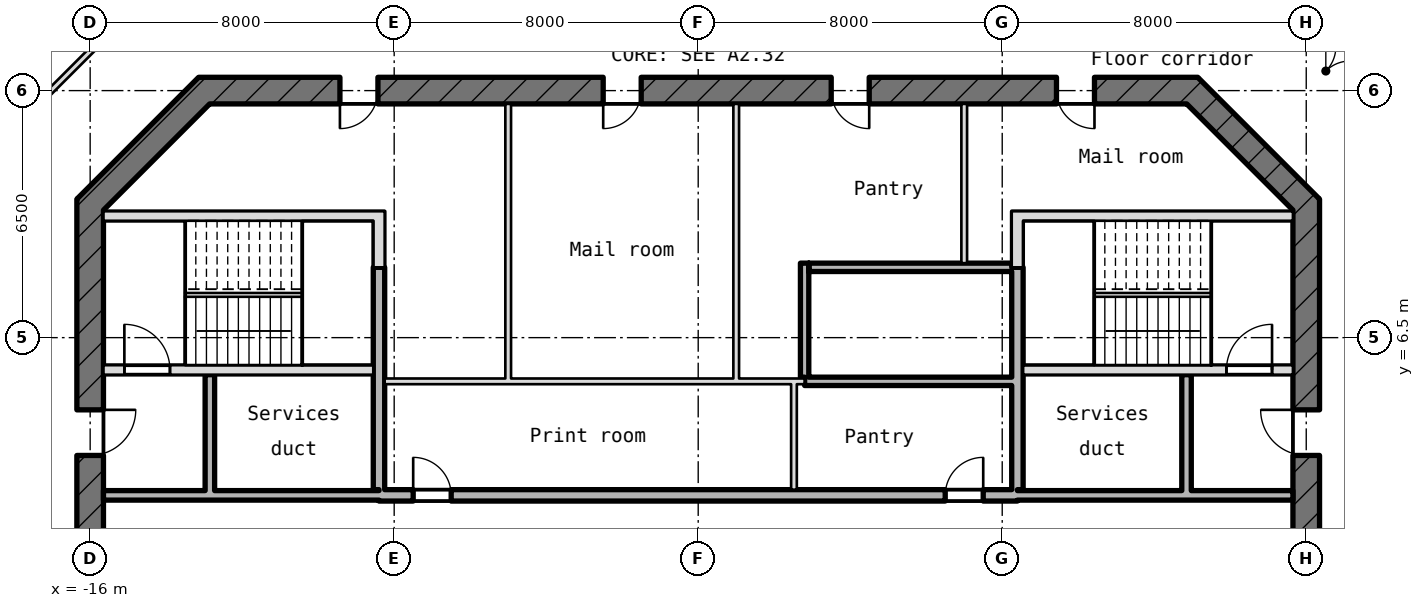
"""IFC4 building model, lengths in metres.
Left out: names, types, materials, properties, quantities, classifications, styles, units other than length and angle.
Written with IfcOpenShell. Run it as: python <this file> out.ifc"""

import sys

from ifc_helpers import new_model, si_unit, direction, frame, frame_2d, origin, place, context, subcontext, project, spatial, rectangle, extrude, element, fill, save


model = new_model("IFC4")
c1 = context("Model", 3, precision=1e-05, world=origin(), true_north=direction((0.0, 1.0)))
c2 = subcontext(c1, "Body", "Model", "MODEL_VIEW")
j1 = project(units=[si_unit("LENGTHUNIT", "METRE"), si_unit("PLANEANGLEUNIT", "RADIAN")], contexts=[c1])
p1 = place(None, origin())
s1 = spatial("IfcSite", under=j1, at=p1, CompositionType="ELEMENT")
p2 = place(p1, origin())
s2 = spatial("IfcBuilding", under=s1, at=p2, CompositionType="ELEMENT")
p3 = place(p2, frame((0.0, 0.0, 346.75)))
s3 = spatial("IfcBuildingStorey", under=s2, at=p3, CompositionType="ELEMENT", Elevation=346.75)
p4 = place(p3, frame((16.0, -10.145, -0.18), z_axis=(0.0, 0.0, 1.0), x_axis=(0.0, 1.0, 0.0)))
e1 = element("IfcWall", 1, at=p4, inside=s3, PredefinedType="SHEAR", context=c2, shape_type="SweptSolid", body=[
    extrude(rectangle(XDim=20.29, YDim=0.7, at=frame_2d((10.145, 0.0))), origin(), (0.0, 0.0, 1.0), 4.15),
])
p5 = place(p4, frame((8.945, 0.0, 0.18)))
e2 = element("IfcOpeningElement", 2, at=p5, cuts=e1, PredefinedType="OPENING", context=c2, shape_type="SweptSolid", body=[
    extrude(rectangle(XDim=2.4, YDim=2.1, at=frame_2d((1.2, 1.05))), frame((0.0, 0.36, 0.0), z_axis=(0.0, -1.0, 0.0), x_axis=(1.0, 0.0, 0.0)), (0.0, 0.0, 1.0), 0.72),
])
p6 = place(p4, frame((13.545, 0.0, 0.18)))
e3 = element("IfcOpeningElement", 3, at=p6, cuts=e1, PredefinedType="OPENING", context=c2, shape_type="SweptSolid", body=[
    extrude(rectangle(XDim=1.2, YDim=2.1, at=frame_2d((0.6, 1.05))), frame((0.0, 0.36, 0.0), z_axis=(0.0, -1.0, 0.0), x_axis=(1.0, 0.0, 0.0)), (0.0, 0.0, 1.0), 0.72),
])
p7 = place(p3, frame((16.103, 9.897, -0.18), z_axis=(0.0, 0.0, 1.0), x_axis=(-0.707106781187, 0.707106781187, 0.0)))
e4 = element("IfcWall", 4, at=p7, inside=s3, PredefinedType="SHEAR", context=c2, shape_type="SweptSolid", body=[
    extrude(rectangle(XDim=4.533, YDim=0.7, at=frame_2d((2.266, 0.0))), origin(), (0.0, 0.0, 1.0), 4.15),
])
p8 = place(p3, frame((13.145, 13.0, -0.18), z_axis=(0.0, 0.0, 1.0), x_axis=(-1.0, 0.0, 0.0)))
e5 = element("IfcWall", 5, at=p8, inside=s3, PredefinedType="SHEAR", context=c2, shape_type="SweptSolid", body=[
    extrude(rectangle(XDim=26.29, YDim=0.7, at=frame_2d((13.145, 0.0))), origin(), (0.0, 0.0, 1.0), 4.15),
])
p9 = place(p8, frame((21.573, 0.0, 0.18)))
e6 = element("IfcOpeningElement", 6, at=p9, cuts=e5, PredefinedType="OPENING", context=c2, shape_type="SweptSolid", body=[
    extrude(rectangle(XDim=1.0, YDim=2.1, at=frame_2d((0.5, 1.05))), frame((0.0, 0.36, 0.0), z_axis=(0.0, -1.0, 0.0), x_axis=(1.0, 0.0, 0.0)), (0.0, 0.0, 1.0), 0.72),
])
p10 = place(p8, frame((14.645, 0.0, 0.18)))
e7 = element("IfcOpeningElement", 7, at=p10, cuts=e5, PredefinedType="OPENING", context=c2, shape_type="SweptSolid", body=[
    extrude(rectangle(XDim=1.0, YDim=2.1, at=frame_2d((0.5, 1.05))), frame((0.0, 0.36, 0.0), z_axis=(0.0, -1.0, 0.0), x_axis=(1.0, 0.0, 0.0)), (0.0, 0.0, 1.0), 0.72),
])
p11 = place(p8, frame((8.645, 0.0, 0.18)))
e8 = element("IfcOpeningElement", 8, at=p11, cuts=e5, PredefinedType="OPENING", context=c2, shape_type="SweptSolid", body=[
    extrude(rectangle(XDim=1.0, YDim=2.1, at=frame_2d((0.5, 1.05))), frame((0.0, 0.36, 0.0), z_axis=(0.0, -1.0, 0.0), x_axis=(1.0, 0.0, 0.0)), (0.0, 0.0, 1.0), 0.72),
])
p12 = place(p8, frame((2.717, 0.0, 0.18)))
e9 = element("IfcOpeningElement", 9, at=p12, cuts=e5, PredefinedType="OPENING", context=c2, shape_type="SweptSolid", body=[
    extrude(rectangle(XDim=1.0, YDim=2.1, at=frame_2d((0.5, 1.05))), frame((0.0, 0.36, 0.0), z_axis=(0.0, -1.0, 0.0), x_axis=(1.0, 0.0, 0.0)), (0.0, 0.0, 1.0), 0.72),
])
p13 = place(p3, frame((-12.897, 13.103, -0.18), z_axis=(0.0, 0.0, 1.0), x_axis=(-0.707106781187, -0.707106781187, 0.0)))
e10 = element("IfcWall", 10, at=p13, inside=s3, PredefinedType="SHEAR", context=c2, shape_type="SweptSolid", body=[
    extrude(rectangle(XDim=4.533, YDim=0.7, at=frame_2d((2.266, 0.0))), origin(), (0.0, 0.0, 1.0), 4.15),
])
p14 = place(p3, frame((-16.0, 10.145, -0.18), z_axis=(0.0, 0.0, 1.0), x_axis=(0.0, -1.0, 0.0)))
e11 = element("IfcWall", 11, at=p14, inside=s3, PredefinedType="SHEAR", context=c2, shape_type="SweptSolid", body=[
    extrude(rectangle(XDim=20.29, YDim=0.7, at=frame_2d((10.145, 0.0))), origin(), (0.0, 0.0, 1.0), 4.15),
])
p15 = place(p14, frame((8.945, 0.0, 0.18)))
e12 = element("IfcOpeningElement", 12, at=p15, cuts=e11, PredefinedType="OPENING", context=c2, shape_type="SweptSolid", body=[
    extrude(rectangle(XDim=2.4, YDim=2.1, at=frame_2d((1.2, 1.05))), frame((0.0, 0.36, 0.0), z_axis=(0.0, -1.0, 0.0), x_axis=(1.0, 0.0, 0.0)), (0.0, 0.0, 1.0), 0.72),
])
p16 = place(p14, frame((5.545, 0.0, 0.18)))
e13 = element("IfcOpeningElement", 13, at=p16, cuts=e11, PredefinedType="OPENING", context=c2, shape_type="SweptSolid", body=[
    extrude(rectangle(XDim=1.2, YDim=2.1, at=frame_2d((0.6, 1.05))), frame((0.0, 0.36, 0.0), z_axis=(0.0, -1.0, 0.0), x_axis=(1.0, 0.0, 0.0)), (0.0, 0.0, 1.0), 0.72),
])
p17 = place(p3, frame((-15.65, 2.35, 0.0), z_axis=(0.0, 0.0, 1.0), x_axis=(1.0, 0.0, 0.0)))
e14 = element("IfcWall", 14, at=p17, inside=s3, PredefinedType="STANDARD", context=c2, shape_type="SweptSolid", body=[
    extrude(rectangle(XDim=7.25, YDim=0.25, at=frame_2d((3.625, 0.0))), origin(), (0.0, 0.0, 1.0), 3.97),
])
p18 = place(p3, frame((-8.4, 2.35, -0.18), z_axis=(0.0, 0.0, 1.0), x_axis=(1.0, 0.0, 0.0)))
e15 = element("IfcWall", 15, at=p18, inside=s3, PredefinedType="SHEAR", context=c2, shape_type="SweptSolid", body=[
    extrude(rectangle(XDim=16.8, YDim=0.3, at=frame_2d((8.4, 0.0))), origin(), (0.0, 0.0, 1.0), 4.15),
])
p19 = place(p18, frame((0.9, 0.0, 0.18)))
e16 = element("IfcOpeningElement", 16, at=p19, cuts=e15, PredefinedType="OPENING", context=c2, shape_type="SweptSolid", body=[
    extrude(rectangle(XDim=1.0, YDim=2.1, at=frame_2d((0.5, 1.05))), frame((0.0, 0.16, 0.0), z_axis=(0.0, -1.0, 0.0), x_axis=(1.0, 0.0, 0.0)), (0.0, 0.0, 1.0), 0.32),
])
p20 = place(p18, frame((14.9, 0.0, 0.18)))
e17 = element("IfcOpeningElement", 17, at=p20, cuts=e15, PredefinedType="OPENING", context=c2, shape_type="SweptSolid", body=[
    extrude(rectangle(XDim=1.0, YDim=2.1, at=frame_2d((0.5, 1.05))), frame((0.0, 0.16, 0.0), z_axis=(0.0, -1.0, 0.0), x_axis=(1.0, 0.0, 0.0)), (0.0, 0.0, 1.0), 0.32),
])
p21 = place(p3, frame((8.4, 2.35, 0.0), z_axis=(0.0, 0.0, 1.0), x_axis=(1.0, 0.0, 0.0)))
e18 = element("IfcWall", 18, at=p21, inside=s3, PredefinedType="STANDARD", context=c2, shape_type="SweptSolid", body=[
    extrude(rectangle(XDim=7.25, YDim=0.25, at=frame_2d((3.625, 0.0))), origin(), (0.0, 0.0, 1.0), 3.97),
])
p22 = place(p3, frame((-8.25, 5.35, 0.0), z_axis=(0.0, 0.0, 1.0), x_axis=(1.0, 0.0, 0.0)))
e19 = element("IfcWall", 19, at=p22, inside=s3, PredefinedType="PARTITIONING", context=c2, shape_type="SweptSolid", body=[
    extrude(rectangle(XDim=11.05, YDim=0.15, at=frame_2d((5.525, 0.0))), origin(), (0.0, 0.0, 1.0), 3.97),
])
p23 = place(p3, frame((2.8, 5.35, 0.0), z_axis=(0.0, 0.0, 1.0), x_axis=(1.0, 0.0, 0.0)))
e20 = element("IfcWall", 20, at=p23, inside=s3, PredefinedType="STANDARD", context=c2, shape_type="SweptSolid", body=[
    extrude(rectangle(XDim=5.45, YDim=0.22, at=frame_2d((2.725, 0.0))), origin(), (0.0, 0.0, 1.0), 3.97),
])
p24 = place(p3, frame((-15.65, 5.65, -0.18), z_axis=(0.0, 0.0, 1.0), x_axis=(1.0, 0.0, 0.0)))
e21 = element("IfcWall", 21, at=p24, inside=s3, PredefinedType="SHEAR", context=c2, shape_type="SweptSolid", body=[
    extrude(rectangle(XDim=7.1, YDim=0.25, at=frame_2d((3.55, 0.0))), origin(), (0.0, 0.0, 1.0), 4.15),
])
p25 = place(p24, frame((0.55, 0.0, 0.18)))
e22 = element("IfcOpeningElement", 22, at=p25, cuts=e21, PredefinedType="OPENING", context=c2, shape_type="SweptSolid", body=[
    extrude(rectangle(XDim=1.2, YDim=2.1, at=frame_2d((0.6, 1.05))), frame((0.0, 0.135, 0.0), z_axis=(0.0, -1.0, 0.0), x_axis=(1.0, 0.0, 0.0)), (0.0, 0.0, 1.0), 0.27),
])
p26 = place(p3, frame((8.55, 5.65, -0.18), z_axis=(0.0, 0.0, 1.0), x_axis=(1.0, 0.0, 0.0)))
e23 = element("IfcWall", 23, at=p26, inside=s3, PredefinedType="SHEAR", context=c2, shape_type="SweptSolid", body=[
    extrude(rectangle(XDim=7.1, YDim=0.25, at=frame_2d((3.55, 0.0))), origin(), (0.0, 0.0, 1.0), 4.15),
])
p27 = place(p26, frame((5.35, 0.0, 0.18)))
e24 = element("IfcOpeningElement", 24, at=p27, cuts=e23, PredefinedType="OPENING", context=c2, shape_type="SweptSolid", body=[
    extrude(rectangle(XDim=1.2, YDim=2.1, at=frame_2d((0.6, 1.05))), frame((0.0, 0.135, 0.0), z_axis=(0.0, -1.0, 0.0), x_axis=(1.0, 0.0, 0.0)), (0.0, 0.0, 1.0), 0.27),
])
p28 = place(p3, frame((2.91, 8.35, 0.0), z_axis=(0.0, 0.0, 1.0), x_axis=(1.0, 0.0, 0.0)))
e25 = element("IfcWall", 25, at=p28, inside=s3, PredefinedType="STANDARD", context=c2, shape_type="SweptSolid", body=[
    extrude(rectangle(XDim=5.34, YDim=0.22, at=frame_2d((2.67, 0.0))), origin(), (0.0, 0.0, 1.0), 3.97),
])
for number, where, z_axis, x_axis in (
    (26, (-15.65, 9.7, -0.18), (0.0, 0.0, 1.0), (1.0, 0.0, 0.0)),
    (27, (8.55, 9.7, -0.18), (0.0, 0.0, 1.0), (1.0, 0.0, 0.0)),
):
    element("IfcWall", number, at=place(p3, frame(where, z_axis=z_axis, x_axis=x_axis)), inside=s3, PredefinedType="SHEAR", context=c2, shape_type="SweptSolid", body=[
        extrude(rectangle(XDim=7.1, YDim=0.25, at=frame_2d((3.55, 0.0))), origin(), (0.0, 0.0, 1.0), 4.15),
    ])
p29 = place(p3, frame((-12.85, 2.475, 0.0), z_axis=(0.0, 0.0, 1.0), x_axis=(0.0, 1.0, 0.0)))
e28 = element("IfcWall", 28, at=p29, inside=s3, PredefinedType="STANDARD", context=c2, shape_type="SweptSolid", body=[
    extrude(rectangle(XDim=3.05, YDim=0.25, at=frame_2d((1.525, 0.0))), origin(), (0.0, 0.0, 1.0), 3.97),
])
p30 = place(p3, frame((-8.4, 2.5, -0.18), z_axis=(0.0, 0.0, 1.0), x_axis=(0.0, 1.0, 0.0)))
e29 = element("IfcWall", 29, at=p30, inside=s3, PredefinedType="SHEAR", context=c2, shape_type="SweptSolid", body=[
    extrude(rectangle(XDim=5.85, YDim=0.3, at=frame_2d((2.925, 0.0))), origin(), (0.0, 0.0, 1.0), 4.15),
])
p31 = place(p3, frame((-8.4, 8.35, -0.18), z_axis=(0.0, 0.0, 1.0), x_axis=(0.0, 1.0, 0.0)))
e30 = element("IfcWall", 30, at=p31, inside=s3, PredefinedType="SHEAR", context=c2, shape_type="SweptSolid", body=[
    extrude(rectangle(XDim=1.475, YDim=0.3, at=frame_2d((0.737, 0.0))), origin(), (0.0, 0.0, 1.0), 4.15),
])
for number, where, z_axis, x_axis in (
    (31, (-5.0, 5.425, 0.0), (0.0, 0.0, 1.0), (0.0, 1.0, 0.0)),
    (32, (1.0, 5.425, 0.0), (0.0, 0.0, 1.0), (0.0, 1.0, 0.0)),
):
    element("IfcWall", number, at=place(p3, frame(where, z_axis=z_axis, x_axis=x_axis)), inside=s3, PredefinedType="PARTITIONING", context=c2, shape_type="SweptSolid", body=[
        extrude(rectangle(XDim=7.225, YDim=0.15, at=frame_2d((3.612, 0.0))), origin(), (0.0, 0.0, 1.0), 3.97),
    ])
p32 = place(p3, frame((2.52, 2.5, 0.0), z_axis=(0.0, 0.0, 1.0), x_axis=(0.0, 1.0, 0.0)))
e33 = element("IfcWall", 33, at=p32, inside=s3, PredefinedType="PARTITIONING", context=c2, shape_type="SweptSolid", body=[
    extrude(rectangle(XDim=2.775, YDim=0.15, at=frame_2d((1.387, 0.0))), origin(), (0.0, 0.0, 1.0), 3.97),
])
p33 = place(p3, frame((2.8, 5.46, 0.0), z_axis=(0.0, 0.0, 1.0), x_axis=(0.0, 1.0, 0.0)))
e34 = element("IfcWall", 34, at=p33, inside=s3, PredefinedType="STANDARD", context=c2, shape_type="SweptSolid", body=[
    extrude(rectangle(XDim=3.0, YDim=0.22, at=frame_2d((1.5, 0.0))), origin(), (0.0, 0.0, 1.0), 3.97),
])
p34 = place(p3, frame((7.0, 8.46, 0.0), z_axis=(0.0, 0.0, 1.0), x_axis=(0.0, 1.0, 0.0)))
e35 = element("IfcWall", 35, at=p34, inside=s3, PredefinedType="PARTITIONING", context=c2, shape_type="SweptSolid", body=[
    extrude(rectangle(XDim=4.19, YDim=0.15, at=frame_2d((2.095, 0.0))), origin(), (0.0, 0.0, 1.0), 3.97),
])
p35 = place(p3, frame((8.4, 2.5, -0.18), z_axis=(0.0, 0.0, 1.0), x_axis=(0.0, 1.0, 0.0)))
e36 = element("IfcWall", 36, at=p35, inside=s3, PredefinedType="SHEAR", context=c2, shape_type="SweptSolid", body=[
    extrude(rectangle(XDim=5.85, YDim=0.3, at=frame_2d((2.925, 0.0))), origin(), (0.0, 0.0, 1.0), 4.15),
])
p36 = place(p3, frame((8.4, 8.35, -0.18), z_axis=(0.0, 0.0, 1.0), x_axis=(0.0, 1.0, 0.0)))
e37 = element("IfcWall", 37, at=p36, inside=s3, PredefinedType="SHEAR", context=c2, shape_type="SweptSolid", body=[
    extrude(rectangle(XDim=1.475, YDim=0.3, at=frame_2d((0.737, 0.0))), origin(), (0.0, 0.0, 1.0), 4.15),
])
p37 = place(p3, frame((12.85, 2.475, 0.0), z_axis=(0.0, 0.0, 1.0), x_axis=(0.0, 1.0, 0.0)))
e38 = element("IfcWall", 38, at=p37, inside=s3, PredefinedType="STANDARD", context=c2, shape_type="SweptSolid", body=[
    extrude(rectangle(XDim=3.05, YDim=0.25, at=frame_2d((1.525, 0.0))), origin(), (0.0, 0.0, 1.0), 3.97),
])
p38 = place(p3, frame((-18.85, 11.18, 0.0), z_axis=(0.0, 0.0, 1.0), x_axis=(0.707106781187, 0.707106781187, 0.0)))
e39 = element("IfcWall", 39, at=p38, inside=s3, PredefinedType="PARTITIONING", context=c2, shape_type="SweptSolid", body=[
    extrude(rectangle(XDim=6.604, YDim=0.15, at=frame_2d((3.302, 0.0))), origin(), (0.0, 0.0, 1.0), 3.97),
])
p39 = place(p3, frame((14.18, 15.85, 0.0), z_axis=(0.0, 0.0, 1.0), x_axis=(0.707106781187, -0.707106781187, 0.0)))
e40 = element("IfcWall", 40, at=p39, inside=s3, PredefinedType="PARTITIONING", context=c2, shape_type="SweptSolid", body=[
    extrude(rectangle(XDim=6.604, YDim=0.15, at=frame_2d((3.302, 0.0))), origin(), (0.0, 0.0, 1.0), 3.97),
])
p40 = place(p39, frame((2.402, 0.0, 0.0)))
e41 = element("IfcOpeningElement", 41, at=p40, cuts=e40, PredefinedType="OPENING", context=c2, shape_type="SweptSolid", body=[
    extrude(rectangle(XDim=1.8, YDim=2.1, at=frame_2d((0.9, 1.05))), frame((0.0, 0.085, 0.0), z_axis=(0.0, -1.0, 0.0), x_axis=(1.0, 0.0, 0.0)), (0.0, 0.0, 1.0), 0.17),
])
p41 = place(p25, origin())
e42 = element("IfcDoor", 42, at=p41, inside=s3, OperationType="SINGLE_SWING_RIGHT", PredefinedType="DOOR", context=c2, shape_type="SweptSolid", body=[
    extrude(rectangle(XDim=1.2, YDim=2.1, at=frame_2d((0.6, 1.05))), frame((0.0, 0.025, 0.0), z_axis=(0.0, -1.0, 0.0), x_axis=(1.0, 0.0, 0.0)), (0.0, 0.0, 1.0), 0.05),
])
fill(e22, e42)
p42 = place(p27, origin())
e43 = element("IfcDoor", 43, at=p42, inside=s3, OperationType="SINGLE_SWING_RIGHT", PredefinedType="DOOR", context=c2, shape_type="SweptSolid", body=[
    extrude(rectangle(XDim=1.2, YDim=2.1, at=frame_2d((0.6, 1.05))), frame((0.0, 0.025, 0.0), z_axis=(0.0, -1.0, 0.0), x_axis=(1.0, 0.0, 0.0)), (0.0, 0.0, 1.0), 0.05),
])
fill(e24, e43)
p43 = place(p16, origin())
e44 = element("IfcDoor", 44, at=p43, inside=s3, OperationType="SINGLE_SWING_RIGHT", PredefinedType="DOOR", context=c2, shape_type="SweptSolid", body=[
    extrude(rectangle(XDim=1.2, YDim=2.1, at=frame_2d((0.6, 1.05))), frame((0.0, 0.025, 0.0), z_axis=(0.0, -1.0, 0.0), x_axis=(1.0, 0.0, 0.0)), (0.0, 0.0, 1.0), 0.05),
])
fill(e13, e44)
p44 = place(p6, origin())
e45 = element("IfcDoor", 45, at=p44, inside=s3, OperationType="SINGLE_SWING_RIGHT", PredefinedType="DOOR", context=c2, shape_type="SweptSolid", body=[
    extrude(rectangle(XDim=1.2, YDim=2.1, at=frame_2d((0.6, 1.05))), frame((0.0, 0.025, 0.0), z_axis=(0.0, -1.0, 0.0), x_axis=(1.0, 0.0, 0.0)), (0.0, 0.0, 1.0), 0.05),
])
fill(e3, e45)
p45 = place(p19, origin())
e46 = element("IfcDoor", 46, at=p45, inside=s3, OperationType="SINGLE_SWING_RIGHT", PredefinedType="DOOR", context=c2, shape_type="SweptSolid", body=[
    extrude(rectangle(XDim=1.0, YDim=2.1, at=frame_2d((0.5, 1.05))), frame((0.0, 0.025, 0.0), z_axis=(0.0, -1.0, 0.0), x_axis=(1.0, 0.0, 0.0)), (0.0, 0.0, 1.0), 0.05),
])
fill(e16, e46)
p46 = place(p20, origin())
e47 = element("IfcDoor", 47, at=p46, inside=s3, OperationType="SINGLE_SWING_RIGHT", PredefinedType="DOOR", context=c2, shape_type="SweptSolid", body=[
    extrude(rectangle(XDim=1.0, YDim=2.1, at=frame_2d((0.5, 1.05))), frame((0.0, 0.025, 0.0), z_axis=(0.0, -1.0, 0.0), x_axis=(1.0, 0.0, 0.0)), (0.0, 0.0, 1.0), 0.05),
])
fill(e17, e47)
p47 = place(p9, origin())
e48 = element("IfcDoor", 48, at=p47, inside=s3, OperationType="SINGLE_SWING_RIGHT", PredefinedType="DOOR", context=c2, shape_type="SweptSolid", body=[
    extrude(rectangle(XDim=1.0, YDim=2.1, at=frame_2d((0.5, 1.05))), frame((0.0, 0.025, 0.0), z_axis=(0.0, -1.0, 0.0), x_axis=(1.0, 0.0, 0.0)), (0.0, 0.0, 1.0), 0.05),
])
fill(e6, e48)
p48 = place(p10, origin())
e49 = element("IfcDoor", 49, at=p48, inside=s3, OperationType="SINGLE_SWING_RIGHT", PredefinedType="DOOR", context=c2, shape_type="SweptSolid", body=[
    extrude(rectangle(XDim=1.0, YDim=2.1, at=frame_2d((0.5, 1.05))), frame((0.0, 0.025, 0.0), z_axis=(0.0, -1.0, 0.0), x_axis=(1.0, 0.0, 0.0)), (0.0, 0.0, 1.0), 0.05),
])
fill(e7, e49)
p49 = place(p11, origin())
e50 = element("IfcDoor", 50, at=p49, inside=s3, OperationType="SINGLE_SWING_RIGHT", PredefinedType="DOOR", context=c2, shape_type="SweptSolid", body=[
    extrude(rectangle(XDim=1.0, YDim=2.1, at=frame_2d((0.5, 1.05))), frame((0.0, 0.025, 0.0), z_axis=(0.0, -1.0, 0.0), x_axis=(1.0, 0.0, 0.0)), (0.0, 0.0, 1.0), 0.05),
])
fill(e8, e50)
p50 = place(p12, origin())
e51 = element("IfcDoor", 51, at=p50, inside=s3, OperationType="SINGLE_SWING_RIGHT", PredefinedType="DOOR", context=c2, shape_type="SweptSolid", body=[
    extrude(rectangle(XDim=1.0, YDim=2.1, at=frame_2d((0.5, 1.05))), frame((0.0, 0.025, 0.0), z_axis=(0.0, -1.0, 0.0), x_axis=(1.0, 0.0, 0.0)), (0.0, 0.0, 1.0), 0.05),
])
fill(e9, e51)
p51 = place(p40, origin())
e52 = element("IfcDoor", 52, at=p51, inside=s3, OperationType="DOUBLE_DOOR_SINGLE_SWING", PredefinedType="DOOR", context=c2, shape_type="SweptSolid", body=[
    extrude(rectangle(XDim=1.8, YDim=2.1, at=frame_2d((0.9, 1.05))), frame((0.0, 0.025, 0.0), z_axis=(0.0, -1.0, 0.0), x_axis=(1.0, 0.0, 0.0)), (0.0, 0.0, 1.0), 0.05),
])
fill(e41, e52)
save(model, sys.argv[1])
